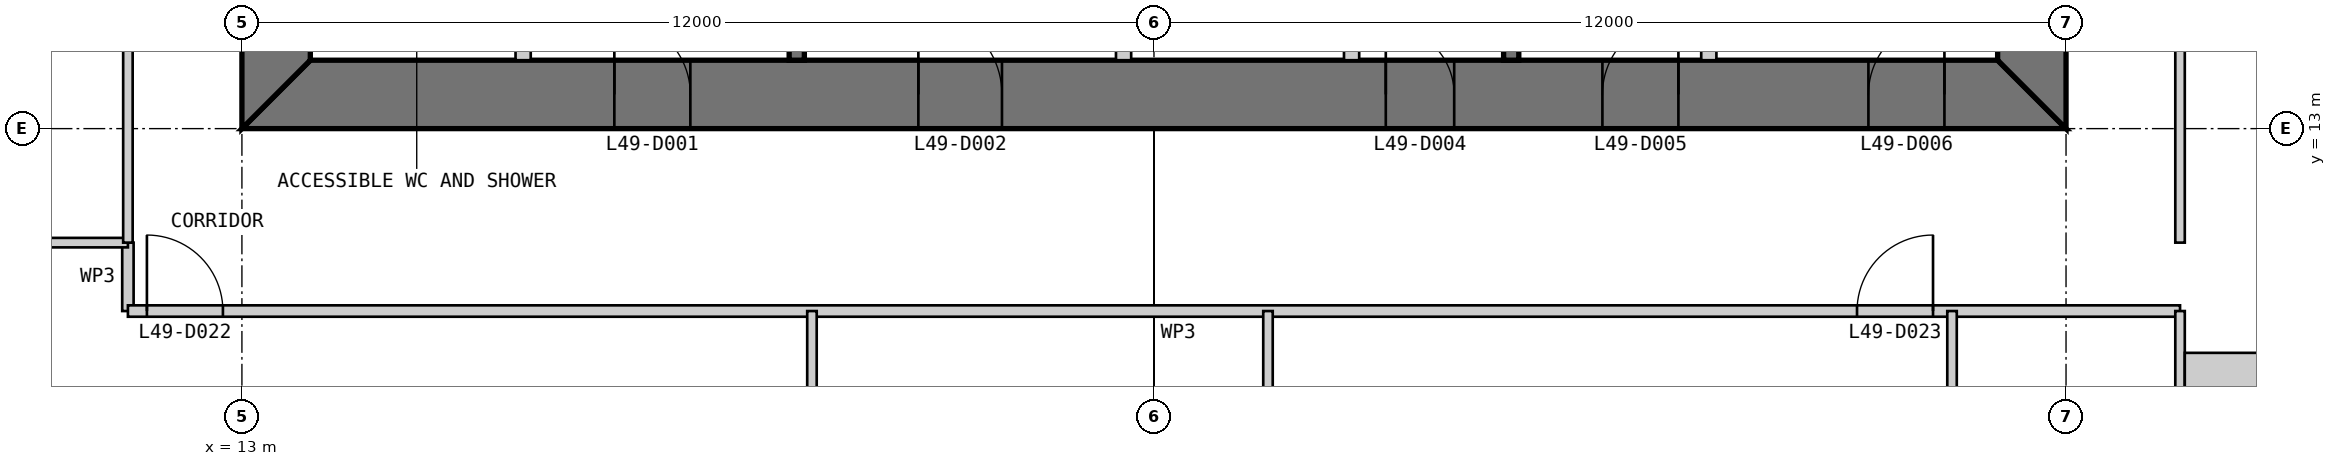
"""IFC4 building model, lengths in metres.
Left out: names, types, materials, properties, quantities, classifications, styles, units other than length and angle.
Written with IfcOpenShell. Run it as: python <this file> out.ifc"""

import sys

from ifc_helpers import new_model, si_unit, direction, frame, frame_2d, origin, place, context, subcontext, project, spatial, polyline, rectangle, outline, extrude, element, fill, save


model = new_model("IFC4")
c1 = context("Model", 3, precision=1e-05, world=origin(), true_north=direction((0.0, 1.0)))
c2 = subcontext(c1, "Body", "Model", "MODEL_VIEW")
j1 = project(units=[si_unit("LENGTHUNIT", "METRE"), si_unit("PLANEANGLEUNIT", "RADIAN")], contexts=[c1])
p1 = place(None, origin())
s1 = spatial("IfcSite", under=j1, at=p1, CompositionType="ELEMENT")
p2 = place(p1, origin())
s2 = spatial("IfcBuilding", under=s1, at=p2, CompositionType="ELEMENT")
p3 = place(p2, frame((0.0, 0.0, 209.8)))
s3 = spatial("IfcBuildingStorey", under=s2, at=p3, CompositionType="ELEMENT", Elevation=209.8)
p4 = place(p3, frame((13.0, 13.45, 0.0), z_axis=(0.0, 0.0, 1.0), x_axis=(1.0, 0.0, 0.0)))
e1 = element("IfcWall", 1, at=p4, inside=s3, PredefinedType="SHEAR", context=c2, shape_type="SweptSolid", body=[
    extrude(outline(polyline([(0.0, -0.45), (24.0, -0.45), (23.1, 0.45), (0.9, 0.45), (0.0, -0.45)])), origin(), (0.0, 0.0, 1.0), 4.0),
])
p5 = place(p4, frame((4.9, 0.0, 0.0)))
e2 = element("IfcOpeningElement", 2, at=p5, cuts=e1, PredefinedType="OPENING", context=c2, shape_type="SweptSolid", body=[
    extrude(rectangle(XDim=1.0, YDim=2.2, at=frame_2d((0.5, 1.1))), frame((0.0, 0.46, 0.0), z_axis=(0.0, -1.0, 0.0), x_axis=(1.0, 0.0, 0.0)), (0.0, 0.0, 1.0), 0.92),
])
p6 = place(p4, frame((8.9, 0.0, 0.0)))
e3 = element("IfcOpeningElement", 3, at=p6, cuts=e1, PredefinedType="OPENING", context=c2, shape_type="SweptSolid", body=[
    extrude(rectangle(XDim=1.1, YDim=2.2, at=frame_2d((0.55, 1.1))), frame((0.0, 0.46, 0.0), z_axis=(0.0, -1.0, 0.0), x_axis=(1.0, 0.0, 0.0)), (0.0, 0.0, 1.0), 0.92),
])
p7 = place(p4, frame((15.05, 0.0, 0.0)))
e4 = element("IfcOpeningElement", 4, at=p7, cuts=e1, PredefinedType="OPENING", context=c2, shape_type="SweptSolid", body=[
    extrude(rectangle(XDim=0.9, YDim=2.2, at=frame_2d((0.45, 1.1))), frame((0.0, 0.46, 0.0), z_axis=(0.0, -1.0, 0.0), x_axis=(1.0, 0.0, 0.0)), (0.0, 0.0, 1.0), 0.92),
])
p8 = place(p4, frame((17.9, 0.0, 0.0)))
e5 = element("IfcOpeningElement", 5, at=p8, cuts=e1, PredefinedType="OPENING", context=c2, shape_type="SweptSolid", body=[
    extrude(rectangle(XDim=1.0, YDim=2.2, at=frame_2d((0.5, 1.1))), frame((0.0, 0.46, 0.0), z_axis=(0.0, -1.0, 0.0), x_axis=(1.0, 0.0, 0.0)), (0.0, 0.0, 1.0), 0.92),
])
p9 = place(p4, frame((21.4, 0.0, 0.0)))
e6 = element("IfcOpeningElement", 6, at=p9, cuts=e1, PredefinedType="OPENING", context=c2, shape_type="SweptSolid", body=[
    extrude(rectangle(XDim=1.0, YDim=2.2, at=frame_2d((0.5, 1.1))), frame((0.0, 0.46, 0.0), z_axis=(0.0, -1.0, 0.0), x_axis=(1.0, 0.0, 0.0)), (0.0, 0.0, 1.0), 0.92),
])
p10 = place(p3, frame((36.55, 13.9, 0.0), z_axis=(0.0, 0.0, 1.0), x_axis=(0.0, 1.0, 0.0)))
e7 = element("IfcWall", 7, at=p10, inside=s3, PredefinedType="SHEAR", context=c2, shape_type="SweptSolid", body=[
    extrude(outline(polyline([(-0.9, -0.45), (23.1, -0.45), (22.2, 0.45), (0.0, 0.45), (-0.9, -0.45)])), origin(), (0.0, 0.0, 1.0), 4.0),
])
p11 = place(p10, frame((20.2, 0.0, 0.0)))
e8 = element("IfcOpeningElement", 8, at=p11, cuts=e7, PredefinedType="OPENING", context=c2, shape_type="SweptSolid", body=[
    extrude(rectangle(XDim=1.0, YDim=2.2, at=frame_2d((0.5, 1.1))), frame((0.0, 0.46, 0.0), z_axis=(0.0, -1.0, 0.0), x_axis=(1.0, 0.0, 0.0)), (0.0, 0.0, 1.0), 0.92),
])
p12 = place(p10, frame((17.25, 0.0, 0.0)))
e9 = element("IfcOpeningElement", 9, at=p12, cuts=e7, PredefinedType="OPENING", context=c2, shape_type="SweptSolid", body=[
    extrude(rectangle(XDim=0.9, YDim=2.2, at=frame_2d((0.45, 1.1))), frame((0.0, 0.46, 0.0), z_axis=(0.0, -1.0, 0.0), x_axis=(1.0, 0.0, 0.0)), (0.0, 0.0, 1.0), 0.92),
])
p13 = place(p3, frame((13.45, 36.1, 0.0), z_axis=(0.0, 0.0, 1.0), x_axis=(0.0, -1.0, 0.0)))
e10 = element("IfcWall", 10, at=p13, inside=s3, PredefinedType="SHEAR", context=c2, shape_type="SweptSolid", body=[
    extrude(outline(polyline([(-0.9, -0.45), (23.1, -0.45), (22.2, 0.45), (0.0, 0.45), (-0.9, -0.45)])), origin(), (0.0, 0.0, 1.0), 4.0),
])
p14 = place(p13, frame((20.2, 0.0, 0.0)))
e11 = element("IfcOpeningElement", 11, at=p14, cuts=e10, PredefinedType="OPENING", context=c2, shape_type="SweptSolid", body=[
    extrude(rectangle(XDim=1.0, YDim=2.2, at=frame_2d((0.5, 1.1))), frame((0.0, 0.46, 0.0), z_axis=(0.0, -1.0, 0.0), x_axis=(1.0, 0.0, 0.0)), (0.0, 0.0, 1.0), 0.92),
])
p15 = place(p13, frame((17.25, 0.0, 0.0)))
e12 = element("IfcOpeningElement", 12, at=p15, cuts=e10, PredefinedType="OPENING", context=c2, shape_type="SweptSolid", body=[
    extrude(rectangle(XDim=0.9, YDim=2.2, at=frame_2d((0.45, 1.1))), frame((0.0, 0.46, 0.0), z_axis=(0.0, -1.0, 0.0), x_axis=(1.0, 0.0, 0.0)), (0.0, 0.0, 1.0), 0.92),
])
p16 = place(p3, frame((16.7, 13.9, 0.0), z_axis=(0.0, 0.0, 1.0), x_axis=(0.0, 1.0, 0.0)))
e13 = element("IfcWall", 13, at=p16, inside=s3, PredefinedType="PARTITIONING", context=c2, shape_type="SweptSolid", body=[
    extrude(rectangle(XDim=16.1, YDim=0.2, at=frame_2d((8.05, 0.0))), origin(), (0.0, 0.0, 1.0), 3.8),
])
p17 = place(p16, frame((9.25, 0.0, 0.0)))
e14 = element("IfcOpeningElement", 14, at=p17, cuts=e13, PredefinedType="OPENING", context=c2, shape_type="SweptSolid", body=[
    extrude(rectangle(XDim=0.9, YDim=2.2, at=frame_2d((0.45, 1.1))), frame((0.0, 0.11, 0.0), z_axis=(0.0, -1.0, 0.0), x_axis=(1.0, 0.0, 0.0)), (0.0, 0.0, 1.0), 0.22),
])
p18 = place(p16, frame((14.45, 0.0, 0.0)))
e15 = element("IfcOpeningElement", 15, at=p18, cuts=e13, PredefinedType="OPENING", context=c2, shape_type="SweptSolid", body=[
    extrude(rectangle(XDim=0.9, YDim=2.2, at=frame_2d((0.45, 1.1))), frame((0.0, 0.11, 0.0), z_axis=(0.0, -1.0, 0.0), x_axis=(1.0, 0.0, 0.0)), (0.0, 0.0, 1.0), 0.22),
])
p19 = place(p3, frame((20.3, 13.9, 0.0), z_axis=(0.0, 0.0, 1.0), x_axis=(0.0, 1.0, 0.0)))
e16 = element("IfcWall", 16, at=p19, inside=s3, PredefinedType="SOLIDWALL", context=c2, shape_type="SweptSolid", body=[
    extrude(rectangle(XDim=16.1, YDim=0.2, at=frame_2d((8.05, 0.0))), origin(), (0.0, 0.0, 1.0), 3.8),
])
p20 = place(p19, frame((6.65, 0.0, 0.0)))
e17 = element("IfcOpeningElement", 17, at=p20, cuts=e16, PredefinedType="OPENING", context=c2, shape_type="SweptSolid", body=[
    extrude(rectangle(XDim=0.9, YDim=2.2, at=frame_2d((0.45, 1.1))), frame((0.0, 0.11, 0.0), z_axis=(0.0, -1.0, 0.0), x_axis=(1.0, 0.0, 0.0)), (0.0, 0.0, 1.0), 0.22),
])
p21 = place(p19, frame((9.35, 0.0, 0.0)))
e18 = element("IfcOpeningElement", 18, at=p21, cuts=e16, PredefinedType="OPENING", context=c2, shape_type="SweptSolid", body=[
    extrude(rectangle(XDim=0.9, YDim=2.2, at=frame_2d((0.45, 1.1))), frame((0.0, 0.11, 0.0), z_axis=(0.0, -1.0, 0.0), x_axis=(1.0, 0.0, 0.0)), (0.0, 0.0, 1.0), 0.22),
])
p22 = place(p19, frame((13.35, 0.0, 0.0)))
e19 = element("IfcOpeningElement", 19, at=p22, cuts=e16, PredefinedType="OPENING", context=c2, shape_type="SweptSolid", body=[
    extrude(rectangle(XDim=0.9, YDim=2.2, at=frame_2d((0.45, 1.1))), frame((0.0, 0.11, 0.0), z_axis=(0.0, -1.0, 0.0), x_axis=(1.0, 0.0, 0.0)), (0.0, 0.0, 1.0), 0.22),
])
p23 = place(p3, frame((24.6, 13.9, 0.0), z_axis=(0.0, 0.0, 1.0), x_axis=(0.0, 1.0, 0.0)))
e20 = element("IfcWall", 20, at=p23, inside=s3, PredefinedType="PARTITIONING", context=c2, shape_type="SweptSolid", body=[
    extrude(rectangle(XDim=3.3, YDim=0.2, at=frame_2d((1.65, 0.0))), origin(), (0.0, 0.0, 1.0), 3.8),
])
p24 = place(p23, frame((0.9, 0.0, 0.0)))
e21 = element("IfcOpeningElement", 21, at=p24, cuts=e20, PredefinedType="OPENING", context=c2, shape_type="SweptSolid", body=[
    extrude(rectangle(XDim=1.1, YDim=2.2, at=frame_2d((0.55, 1.1))), frame((0.0, 0.11, 0.0), z_axis=(0.0, -1.0, 0.0), x_axis=(1.0, 0.0, 0.0)), (0.0, 0.0, 1.0), 0.22),
])
p25 = place(p3, frame((27.6, 13.9, 0.0), z_axis=(0.0, 0.0, 1.0), x_axis=(0.0, 1.0, 0.0)))
e22 = element("IfcWall", 22, at=p25, inside=s3, PredefinedType="PARTITIONING", context=c2, shape_type="SweptSolid", body=[
    extrude(rectangle(XDim=3.3, YDim=0.2, at=frame_2d((1.65, 0.0))), origin(), (0.0, 0.0, 1.0), 3.8),
])
p26 = place(p3, frame((29.7, 13.9, 0.0), z_axis=(0.0, 0.0, 1.0), x_axis=(0.0, 1.0, 0.0)))
e23 = element("IfcWall", 23, at=p26, inside=s3, PredefinedType="SOLIDWALL", context=c2, shape_type="SweptSolid", body=[
    extrude(rectangle(XDim=6.1, YDim=0.2, at=frame_2d((3.05, 0.0))), origin(), (0.0, 0.0, 1.0), 3.8),
])
p27 = place(p3, frame((32.3, 13.9, 0.0), z_axis=(0.0, 0.0, 1.0), x_axis=(0.0, 1.0, 0.0)))
e24 = element("IfcWall", 24, at=p27, inside=s3, PredefinedType="PARTITIONING", context=c2, shape_type="SweptSolid", body=[
    extrude(rectangle(XDim=6.1, YDim=0.2, at=frame_2d((3.05, 0.0))), origin(), (0.0, 0.0, 1.0), 3.8),
])
p28 = place(p3, frame((11.5, 11.5, 0.0), z_axis=(0.0, 0.0, 1.0), x_axis=(0.0, -1.0, 0.0)))
e25 = element("IfcWall", 25, at=p28, inside=s3, PredefinedType="PARTITIONING", context=c2, shape_type="SweptSolid", body=[
    extrude(rectangle(XDim=0.9, YDim=0.15, at=frame_2d((0.45, 0.0))), origin(), (0.0, 0.0, 1.0), 3.85),
])
p29 = place(p3, frame((11.5, 10.6, 0.0), z_axis=(0.0, 0.0, 1.0), x_axis=(1.0, 0.0, 0.0)))
e26 = element("IfcWall", 26, at=p29, inside=s3, PredefinedType="PARTITIONING", context=c2, shape_type="SweptSolid", body=[
    extrude(rectangle(XDim=27.0, YDim=0.15, at=frame_2d((13.5, 0.0))), origin(), (0.0, 0.0, 1.0), 3.85),
])
p30 = place(p29, frame((0.25, 0.0, 0.0)))
e27 = element("IfcOpeningElement", 27, at=p30, cuts=e26, PredefinedType="OPENING", context=c2, shape_type="SweptSolid", body=[
    extrude(rectangle(XDim=1.0, YDim=2.2, at=frame_2d((0.5, 1.1))), frame((0.0, 0.085, 0.0), z_axis=(0.0, -1.0, 0.0), x_axis=(1.0, 0.0, 0.0)), (0.0, 0.0, 1.0), 0.17),
])
p31 = place(p29, frame((22.75, 0.0, 0.0)))
e28 = element("IfcOpeningElement", 28, at=p31, cuts=e26, PredefinedType="OPENING", context=c2, shape_type="SweptSolid", body=[
    extrude(rectangle(XDim=1.0, YDim=2.2, at=frame_2d((0.5, 1.1))), frame((0.0, 0.085, 0.0), z_axis=(0.0, -1.0, 0.0), x_axis=(1.0, 0.0, 0.0)), (0.0, 0.0, 1.0), 0.17),
])
p32 = place(p3, frame((0.15, 11.5, 0.0), z_axis=(0.0, 0.0, 1.0), x_axis=(1.0, 0.0, 0.0)))
e29 = element("IfcWall", 29, at=p32, inside=s3, PredefinedType="PARTITIONING", context=c2, shape_type="SweptSolid", body=[
    extrude(rectangle(XDim=11.35, YDim=0.125, at=frame_2d((5.675, 0.0))), origin(), (0.0, 0.0, 1.0), 3.85),
])
p33 = place(p3, frame((20.5, 4.0, 0.0), z_axis=(0.0, 0.0, 1.0), x_axis=(0.0, 1.0, 0.0)))
e30 = element("IfcWall", 30, at=p33, inside=s3, PredefinedType="PARTITIONING", context=c2, shape_type="SweptSolid", body=[
    extrude(rectangle(XDim=6.6, YDim=0.125, at=frame_2d((3.3, 0.0))), origin(), (0.0, 0.0, 1.0), 3.85),
])
p34 = place(p3, frame((26.5, 4.0, 0.0), z_axis=(0.0, 0.0, 1.0), x_axis=(0.0, 1.0, 0.0)))
e31 = element("IfcWall", 31, at=p34, inside=s3, PredefinedType="PARTITIONING", context=c2, shape_type="SweptSolid", body=[
    extrude(rectangle(XDim=6.6, YDim=0.125, at=frame_2d((3.3, 0.0))), origin(), (0.0, 0.0, 1.0), 3.85),
])
p35 = place(p34, frame((2.8, 0.0, 0.0)))
e32 = element("IfcOpeningElement", 32, at=p35, cuts=e31, PredefinedType="OPENING", context=c2, shape_type="SweptSolid", body=[
    extrude(rectangle(XDim=1.0, YDim=2.2, at=frame_2d((0.5, 1.1))), frame((0.0, 0.073, 0.0), z_axis=(0.0, -1.0, 0.0), x_axis=(1.0, 0.0, 0.0)), (0.0, 0.0, 1.0), 0.145),
])
p36 = place(p3, frame((35.5, 4.0, 0.0), z_axis=(0.0, 0.0, 1.0), x_axis=(0.0, 1.0, 0.0)))
e33 = element("IfcWall", 33, at=p36, inside=s3, PredefinedType="PARTITIONING", context=c2, shape_type="SweptSolid", body=[
    extrude(rectangle(XDim=6.6, YDim=0.125, at=frame_2d((3.3, 0.0))), origin(), (0.0, 0.0, 1.0), 3.85),
])
p37 = place(p36, frame((2.85, 0.0, 0.0)))
e34 = element("IfcOpeningElement", 34, at=p37, cuts=e33, PredefinedType="OPENING", context=c2, shape_type="SweptSolid", body=[
    extrude(rectangle(XDim=0.9, YDim=2.2, at=frame_2d((0.45, 1.1))), frame((0.0, 0.073, 0.0), z_axis=(0.0, -1.0, 0.0), x_axis=(1.0, 0.0, 0.0)), (0.0, 0.0, 1.0), 0.145),
])
p38 = place(p3, frame((38.5, 0.15, 0.0), z_axis=(0.0, 0.0, 1.0), x_axis=(0.0, 1.0, 0.0)))
e35 = element("IfcWall", 35, at=p38, inside=s3, PredefinedType="PARTITIONING", context=c2, shape_type="SweptSolid", body=[
    extrude(rectangle(XDim=10.45, YDim=0.125, at=frame_2d((5.225, 0.0))), origin(), (0.0, 0.0, 1.0), 3.85),
])
for number, where, z_axis, x_axis in (
    (36, (38.5, 11.5, 0.0), (0.0, 0.0, 1.0), (0.0, 1.0, 0.0)),
    (37, (11.5, 14.5, 0.0), (0.0, 0.0, 1.0), (0.0, -1.0, 0.0)),
):
    element("IfcWall", number, at=place(p3, frame(where, z_axis=z_axis, x_axis=x_axis)), inside=s3, PredefinedType="PARTITIONING", context=c2, shape_type="SweptSolid", body=[
        extrude(rectangle(XDim=3.0, YDim=0.125, at=frame_2d((1.5, 0.0))), origin(), (0.0, 0.0, 1.0), 3.85),
    ])
p39 = place(p3, frame((38.562, 9.0, 0.0), z_axis=(0.0, 0.0, 1.0), x_axis=(1.0, 0.0, 0.0)))
e38 = element("IfcWall", 38, at=p39, inside=s3, PredefinedType="PARTITIONING", context=c2, shape_type="SweptSolid", body=[
    extrude(rectangle(XDim=1.438, YDim=2.1, at=frame_2d((0.719, 0.0))), origin(), (0.0, 0.0, 1.0), 3.85),
])
p40 = place(p5, origin())
e39 = element("IfcDoor", 39, at=p40, inside=s3, OperationType="SINGLE_SWING_LEFT", PredefinedType="DOOR", context=c2, shape_type="SweptSolid", body=[
    extrude(rectangle(XDim=1.0, YDim=2.2, at=frame_2d((0.5, 1.1))), frame((0.0, 0.025, 0.0), z_axis=(0.0, -1.0, 0.0), x_axis=(1.0, 0.0, 0.0)), (0.0, 0.0, 1.0), 0.05),
    extrude(outline(polyline([(0.0, 0.0), (0.04, 0.0), (0.04, 2.16), (0.96, 2.16), (0.96, 0.0), (1.0, 0.0), (1.0, 2.2), (0.0, 2.2), (0.0, 0.0)])), frame((0.0, 0.3, 0.0), z_axis=(0.0, -1.0, 0.0), x_axis=(1.0, 0.0, 0.0)), (0.0, 0.0, 1.0), 0.6),
])
fill(e2, e39)
p41 = place(p6, origin())
e40 = element("IfcDoor", 40, at=p41, inside=s3, OperationType="SINGLE_SWING_LEFT", PredefinedType="DOOR", context=c2, shape_type="SweptSolid", body=[
    extrude(rectangle(XDim=1.1, YDim=2.2, at=frame_2d((0.55, 1.1))), frame((0.0, 0.025, 0.0), z_axis=(0.0, -1.0, 0.0), x_axis=(1.0, 0.0, 0.0)), (0.0, 0.0, 1.0), 0.05),
    extrude(outline(polyline([(0.0, 0.0), (0.04, 0.0), (0.04, 2.16), (1.06, 2.16), (1.06, 0.0), (1.1, 0.0), (1.1, 2.2), (0.0, 2.2), (0.0, 0.0)])), frame((0.0, 0.3, 0.0), z_axis=(0.0, -1.0, 0.0), x_axis=(1.0, 0.0, 0.0)), (0.0, 0.0, 1.0), 0.6),
])
fill(e3, e40)
p42 = place(p7, origin())
e41 = element("IfcDoor", 41, at=p42, inside=s3, OperationType="SINGLE_SWING_LEFT", PredefinedType="DOOR", context=c2, shape_type="SweptSolid", body=[
    extrude(rectangle(XDim=0.9, YDim=2.2, at=frame_2d((0.45, 1.1))), frame((0.0, 0.025, 0.0), z_axis=(0.0, -1.0, 0.0), x_axis=(1.0, 0.0, 0.0)), (0.0, 0.0, 1.0), 0.05),
    extrude(outline(polyline([(0.0, 0.0), (0.04, 0.0), (0.04, 2.16), (0.86, 2.16), (0.86, 0.0), (0.9, 0.0), (0.9, 2.2), (0.0, 2.2), (0.0, 0.0)])), frame((0.0, 0.3, 0.0), z_axis=(0.0, -1.0, 0.0), x_axis=(1.0, 0.0, 0.0)), (0.0, 0.0, 1.0), 0.6),
])
fill(e4, e41)
p43 = place(p8, origin())
e42 = element("IfcDoor", 42, at=p43, inside=s3, OperationType="SINGLE_SWING_RIGHT", PredefinedType="DOOR", context=c2, shape_type="SweptSolid", body=[
    extrude(rectangle(XDim=1.0, YDim=2.2, at=frame_2d((0.5, 1.1))), frame((0.0, 0.025, 0.0), z_axis=(0.0, -1.0, 0.0), x_axis=(1.0, 0.0, 0.0)), (0.0, 0.0, 1.0), 0.05),
    extrude(outline(polyline([(0.0, 0.0), (0.04, 0.0), (0.04, 2.16), (0.96, 2.16), (0.96, 0.0), (1.0, 0.0), (1.0, 2.2), (0.0, 2.2), (0.0, 0.0)])), frame((0.0, 0.3, 0.0), z_axis=(0.0, -1.0, 0.0), x_axis=(1.0, 0.0, 0.0)), (0.0, 0.0, 1.0), 0.6),
])
fill(e5, e42)
p44 = place(p9, origin())
e43 = element("IfcDoor", 43, at=p44, inside=s3, OperationType="SINGLE_SWING_RIGHT", PredefinedType="DOOR", context=c2, shape_type="SweptSolid", body=[
    extrude(rectangle(XDim=1.0, YDim=2.2, at=frame_2d((0.5, 1.1))), frame((0.0, 0.025, 0.0), z_axis=(0.0, -1.0, 0.0), x_axis=(1.0, 0.0, 0.0)), (0.0, 0.0, 1.0), 0.05),
    extrude(outline(polyline([(0.0, 0.0), (0.04, 0.0), (0.04, 2.16), (0.96, 2.16), (0.96, 0.0), (1.0, 0.0), (1.0, 2.2), (0.0, 2.2), (0.0, 0.0)])), frame((0.0, 0.3, 0.0), z_axis=(0.0, -1.0, 0.0), x_axis=(1.0, 0.0, 0.0)), (0.0, 0.0, 1.0), 0.6),
])
fill(e6, e43)
p45 = place(p30, origin())
e44 = element("IfcDoor", 44, at=p45, inside=s3, OperationType="SINGLE_SWING_LEFT", PredefinedType="DOOR", context=c2, shape_type="SweptSolid", body=[
    extrude(rectangle(XDim=1.0, YDim=2.2, at=frame_2d((0.5, 1.1))), frame((0.0, 0.025, 0.0), z_axis=(0.0, -1.0, 0.0), x_axis=(1.0, 0.0, 0.0)), (0.0, 0.0, 1.0), 0.05),
])
fill(e27, e44)
p46 = place(p31, origin())
e45 = element("IfcDoor", 45, at=p46, inside=s3, OperationType="SINGLE_SWING_RIGHT", PredefinedType="DOOR", context=c2, shape_type="SweptSolid", body=[
    extrude(rectangle(XDim=1.0, YDim=2.2, at=frame_2d((0.5, 1.1))), frame((0.0, 0.025, 0.0), z_axis=(0.0, -1.0, 0.0), x_axis=(1.0, 0.0, 0.0)), (0.0, 0.0, 1.0), 0.05),
])
fill(e28, e45)
save(model, sys.argv[1])
